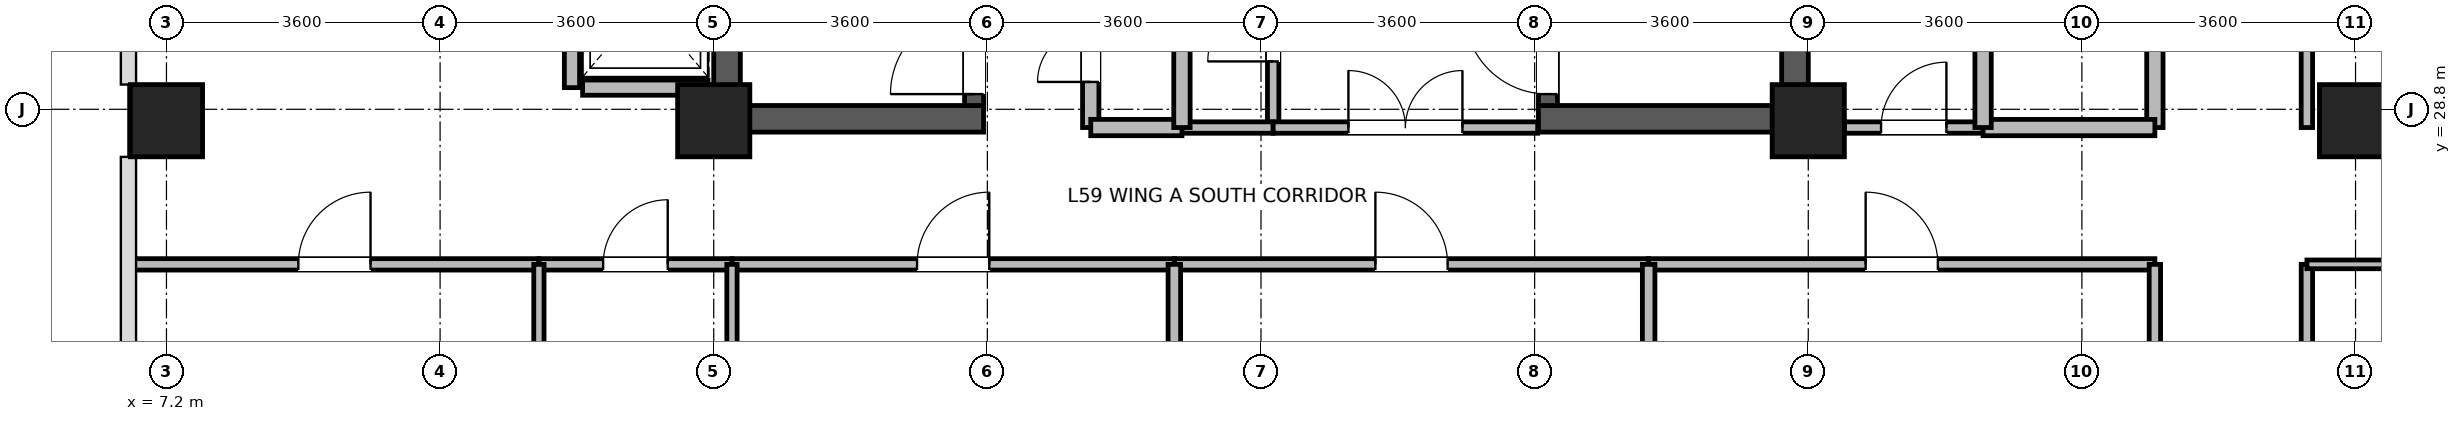
"""IFC4 building model, lengths in metres.
Left out: names, types, materials, properties, quantities, classifications, styles, units other than length and angle.
Written with IfcOpenShell. Run it as: python <this file> out.ifc"""

import sys

from ifc_helpers import new_model, si_unit, direction, frame, frame_2d, origin, origin_2d, place, context, subcontext, project, spatial, rectangle, extrude, source, transform, mapped, element, fill, save


model = new_model("IFC4")
c1 = context("Model", 3, precision=1e-05, world=origin(), true_north=direction((0.0, 1.0)))
c2 = subcontext(c1, "Body", "Model", "MODEL_VIEW")
j1 = project(units=[si_unit("LENGTHUNIT", "METRE"), si_unit("PLANEANGLEUNIT", "RADIAN")], contexts=[c1])
p1 = place(None, origin())
s1 = spatial("IfcSite", under=j1, at=p1, CompositionType="ELEMENT")
p2 = place(p1, origin())
s2 = spatial("IfcBuilding", under=s1, at=p2, CompositionType="ELEMENT")
p3 = place(p2, frame((0.0, 0.0, 231.4)))
s3 = spatial("IfcBuildingStorey", under=s2, at=p3, CompositionType="ELEMENT", Elevation=231.4)
for number, where, z_axis, x_axis in (
    (1, (14.575, 28.5, 0.0), (0.0, 0.0, 1.0), (0.0, 1.0, 0.0)),
    (2, (28.625, 28.5, 0.0), (0.0, 0.0, 1.0), (0.0, 1.0, 0.0)),
):
    element("IfcWall", number, at=place(p3, frame(where, z_axis=z_axis, x_axis=x_axis)), inside=s3, PredefinedType="SHEAR", context=c2, shape_type="SweptSolid", body=[
        extrude(rectangle(XDim=7.7, YDim=0.35, at=frame_2d((3.85, 0.0))), origin(), (0.0, 0.0, 1.0), 3.44),
    ])
for number, where, z_axis, x_axis in (
    (3, (14.75, 28.675, 0.0), (0.0, 0.0, 1.0), (1.0, 0.0, 0.0)),
    (4, (25.25, 28.675, 0.0), (0.0, 0.0, 1.0), (1.0, 0.0, 0.0)),
):
    element("IfcWall", number, at=place(p3, frame(where, z_axis=z_axis, x_axis=x_axis)), inside=s3, PredefinedType="SHEAR", context=c2, shape_type="SweptSolid", body=[
        extrude(rectangle(XDim=3.2, YDim=0.35, at=frame_2d((1.6, 0.0))), origin(), (0.0, 0.0, 1.0), 3.44),
    ])
p4 = place(p3, frame((17.825, 28.85, 0.0), z_axis=(0.0, 0.0, 1.0), x_axis=(0.0, 1.0, 0.0)))
e5 = element("IfcWall", 5, at=p4, inside=s3, PredefinedType="SHEAR", context=c2, shape_type="SweptSolid", body=[
    extrude(rectangle(XDim=7.0, YDim=0.25, at=frame_2d((3.5, 0.0))), origin(), (0.0, 0.0, 1.0), 3.44),
])
p5 = place(p4, frame((0.15, 0.0, 0.0)))
e6 = element("IfcOpeningElement", 6, at=p5, cuts=e5, PredefinedType="OPENING", context=c2, shape_type="SweptSolid", body=[
    extrude(rectangle(XDim=1.1, YDim=2.08, at=frame_2d((0.55, 1.04))), frame((0.0, 0.135, 0.0), z_axis=(0.0, -1.0, 0.0), x_axis=(1.0, 0.0, 0.0)), (0.0, 0.0, 1.0), 0.27),
])
p6 = place(p3, frame((25.375, 28.85, 0.0), z_axis=(0.0, 0.0, 1.0), x_axis=(0.0, 1.0, 0.0)))
e7 = element("IfcWall", 7, at=p6, inside=s3, PredefinedType="SHEAR", context=c2, shape_type="SweptSolid", body=[
    extrude(rectangle(XDim=7.0, YDim=0.25, at=frame_2d((3.5, 0.0))), origin(), (0.0, 0.0, 1.0), 3.44),
])
p7 = place(p6, frame((0.15, 0.0, 0.0)))
e8 = element("IfcOpeningElement", 8, at=p7, cuts=e7, PredefinedType="OPENING", context=c2, shape_type="SweptSolid", body=[
    extrude(rectangle(XDim=1.1, YDim=2.08, at=frame_2d((0.55, 1.04))), frame((0.0, 0.135, 0.0), z_axis=(0.0, -1.0, 0.0), x_axis=(1.0, 0.0, 0.0)), (0.0, 0.0, 1.0), 0.27),
])
m1 = source(origin(), c2, "Body", "SweptSolid", [
    extrude(rectangle(XDim=0.95, YDim=0.95, at=origin_2d()), origin(), (0.0, 0.0, 1.0), 3.7),
])
for number, where, z_axis, x_axis in (
    (9, (7.2, 28.65, 0.0), (0.0, 0.0, 1.0), (1.0, 0.0, 0.0)),
    (10, (14.4, 28.65, 0.0), (0.0, 0.0, 1.0), (1.0, 0.0, 0.0)),
    (11, (28.8, 28.65, 0.0), (0.0, 0.0, 1.0), (1.0, 0.0, 0.0)),
    (12, (36.0, 28.65, 0.0), (0.0, 0.0, 1.0), (1.0, 0.0, 0.0)),
):
    element("IfcColumn", number, at=place(p3, frame(where, z_axis=z_axis, x_axis=x_axis)), inside=s3, PredefinedType="COLUMN", context=c2, shape_type="MappedRepresentation", body=[
        mapped(m1, transform((0.0, 0.0, 0.0), x_axis=(1.0, 0.0, 0.0), y_axis=(0.0, 1.0, 0.0), z_axis=(0.0, 0.0, 1.0), scale=1.0)),
    ])
p8 = place(p3, frame((12.675, 29.085, 0.0), z_axis=(0.0, 0.0, 1.0), x_axis=(1.0, 0.0, 0.0)))
e13 = element("IfcWall", 13, at=p8, inside=s3, PredefinedType="PARTITIONING", context=c2, shape_type="SweptSolid", body=[
    extrude(rectangle(XDim=1.65, YDim=0.2, at=frame_2d((0.825, 0.0))), origin(), (0.0, 0.0, 1.0), 3.42),
])
p9 = place(p3, frame((12.535, 29.085, 0.0), z_axis=(0.0, 0.0, 1.0), x_axis=(0.0, 1.0, 0.0)))
e14 = element("IfcWall", 14, at=p9, inside=s3, PredefinedType="PARTITIONING", context=c2, shape_type="SweptSolid", body=[
    extrude(rectangle(XDim=2.23, YDim=0.2, at=frame_2d((1.115, 0.0))), origin(), (0.0, 0.0, 1.0), 3.42),
])
p10 = place(p3, frame((35.36, 16.96, 0.0), z_axis=(0.0, 0.0, 1.0), x_axis=(0.0, 1.0, 0.0)))
e15 = element("IfcWall", 15, at=p10, inside=s3, PredefinedType="PARTITIONING", context=c2, shape_type="SweptSolid", body=[
    extrude(rectangle(XDim=9.8, YDim=0.15, at=frame_2d((4.9, 0.0))), origin(), (0.0, 0.0, 1.0), 3.42),
])
p11 = place(p10, frame((2.486, 0.0, 0.0)))
e16 = element("IfcOpeningElement", 16, at=p11, cuts=e15, PredefinedType="OPENING", context=c2, shape_type="SweptSolid", body=[
    extrude(rectangle(XDim=1.3, YDim=2.12, at=frame_2d((0.65, 1.06))), frame((0.0, 0.085, 0.0), z_axis=(0.0, -1.0, 0.0), x_axis=(1.0, 0.0, 0.0)), (0.0, 0.0, 1.0), 0.17),
])
p12 = place(p3, frame((35.36, 28.56, 0.0), z_axis=(0.0, 0.0, 1.0), x_axis=(0.0, 1.0, 0.0)))
e17 = element("IfcWall", 17, at=p12, inside=s3, PredefinedType="PARTITIONING", context=c2, shape_type="SweptSolid", body=[
    extrude(rectangle(XDim=7.68, YDim=0.15, at=frame_2d((3.84, 0.0))), origin(), (0.0, 0.0, 1.0), 3.42),
])
p13 = place(p12, frame((3.19, 0.0, 0.0)))
e18 = element("IfcOpeningElement", 18, at=p13, cuts=e17, PredefinedType="OPENING", context=c2, shape_type="SweptSolid", body=[
    extrude(rectangle(XDim=1.3, YDim=2.12, at=frame_2d((0.65, 1.06))), frame((0.0, 0.085, 0.0), z_axis=(0.0, -1.0, 0.0), x_axis=(1.0, 0.0, 0.0)), (0.0, 0.0, 1.0), 0.17),
])
p14 = place(p3, frame((26.7, 26.76, 0.0), z_axis=(0.0, 0.0, 1.0), x_axis=(1.0, 0.0, 0.0)))
e19 = element("IfcWall", 19, at=p14, inside=s3, PredefinedType="PARTITIONING", context=c2, shape_type="SweptSolid", body=[
    extrude(rectangle(XDim=6.66, YDim=0.15, at=frame_2d((3.33, 0.0))), origin(), (0.0, 0.0, 1.0), 3.42),
])
p15 = place(p14, frame((2.855, 0.0, 0.0)))
e20 = element("IfcOpeningElement", 20, at=p15, cuts=e19, PredefinedType="OPENING", context=c2, shape_type="SweptSolid", body=[
    extrude(rectangle(XDim=0.95, YDim=2.1, at=frame_2d((0.475, 1.05))), frame((0.0, 0.085, 0.0), z_axis=(0.0, -1.0, 0.0), x_axis=(1.0, 0.0, 0.0)), (0.0, 0.0, 1.0), 0.17),
])
p16 = place(p3, frame((20.46, 26.76, 0.0), z_axis=(0.0, 0.0, 1.0), x_axis=(1.0, 0.0, 0.0)))
e21 = element("IfcWall", 21, at=p16, inside=s3, PredefinedType="PARTITIONING", context=c2, shape_type="SweptSolid", body=[
    extrude(rectangle(XDim=6.24, YDim=0.15, at=frame_2d((3.12, 0.0))), origin(), (0.0, 0.0, 1.0), 3.42),
])
p17 = place(p16, frame((2.645, 0.0, 0.0)))
e22 = element("IfcOpeningElement", 22, at=p17, cuts=e21, PredefinedType="OPENING", context=c2, shape_type="SweptSolid", body=[
    extrude(rectangle(XDim=0.95, YDim=2.1, at=frame_2d((0.475, 1.05))), frame((0.0, 0.085, 0.0), z_axis=(0.0, -1.0, 0.0), x_axis=(1.0, 0.0, 0.0)), (0.0, 0.0, 1.0), 0.17),
])
p18 = place(p3, frame((14.64, 26.76, 0.0), z_axis=(0.0, 0.0, 1.0), x_axis=(1.0, 0.0, 0.0)))
e23 = element("IfcWall", 23, at=p18, inside=s3, PredefinedType="PARTITIONING", context=c2, shape_type="SweptSolid", body=[
    extrude(rectangle(XDim=5.82, YDim=0.15, at=frame_2d((2.91, 0.0))), origin(), (0.0, 0.0, 1.0), 3.42),
])
p19 = place(p18, frame((2.435, 0.0, 0.0)))
e24 = element("IfcOpeningElement", 24, at=p19, cuts=e23, PredefinedType="OPENING", context=c2, shape_type="SweptSolid", body=[
    extrude(rectangle(XDim=0.95, YDim=2.1, at=frame_2d((0.475, 1.05))), frame((0.0, 0.085, 0.0), z_axis=(0.0, -1.0, 0.0), x_axis=(1.0, 0.0, 0.0)), (0.0, 0.0, 1.0), 0.17),
])
p20 = place(p3, frame((6.72, 26.76, 0.0), z_axis=(0.0, 0.0, 1.0), x_axis=(1.0, 0.0, 0.0)))
e25 = element("IfcWall", 25, at=p20, inside=s3, PredefinedType="PARTITIONING", context=c2, shape_type="SweptSolid", body=[
    extrude(rectangle(XDim=5.38, YDim=0.15, at=frame_2d((2.69, 0.0))), origin(), (0.0, 0.0, 1.0), 3.42),
])
p21 = place(p20, frame((2.215, 0.0, 0.0)))
e26 = element("IfcOpeningElement", 26, at=p21, cuts=e25, PredefinedType="OPENING", context=c2, shape_type="SweptSolid", body=[
    extrude(rectangle(XDim=0.95, YDim=2.1, at=frame_2d((0.475, 1.05))), frame((0.0, 0.085, 0.0), z_axis=(0.0, -1.0, 0.0), x_axis=(1.0, 0.0, 0.0)), (0.0, 0.0, 1.0), 0.17),
])
p22 = place(p3, frame((33.36, 21.6, 0.0), z_axis=(0.0, 0.0, 1.0), x_axis=(0.0, 1.0, 0.0)))
e27 = element("IfcWall", 27, at=p22, inside=s3, PredefinedType="PARTITIONING", context=c2, shape_type="SweptSolid", body=[
    extrude(rectangle(XDim=5.16, YDim=0.15, at=frame_2d((2.58, 0.0))), origin(), (0.0, 0.0, 1.0), 3.42),
])
p23 = place(p3, frame((33.36, 28.56, 0.0), z_axis=(0.0, 0.0, 1.0), x_axis=(0.0, 1.0, 0.0)))
e28 = element("IfcWall", 28, at=p23, inside=s3, PredefinedType="PARTITIONING", context=c2, shape_type="SweptSolid", body=[
    extrude(rectangle(XDim=3.84, YDim=0.215, at=frame_2d((1.92, 0.0))), origin(), (0.0, 0.0, 1.0), 3.42),
])
p24 = place(p23, frame((1.22, 0.0, 0.0)))
e29 = element("IfcOpeningElement", 29, at=p24, cuts=e28, PredefinedType="OPENING", context=c2, shape_type="SweptSolid", body=[
    extrude(rectangle(XDim=1.4, YDim=2.15, at=frame_2d((0.7, 1.075))), frame((0.0, 0.118, 0.0), z_axis=(0.0, -1.0, 0.0), x_axis=(1.0, 0.0, 0.0)), (0.0, 0.0, 1.0), 0.235),
])
p25 = place(p3, frame((19.36, 28.56, 0.0), z_axis=(0.0, 0.0, 1.0), x_axis=(0.0, 1.0, 0.0)))
e30 = element("IfcWall", 30, at=p25, inside=s3, PredefinedType="PARTITIONING", context=c2, shape_type="SweptSolid", body=[
    extrude(rectangle(XDim=2.6, YDim=0.215, at=frame_2d((1.3, 0.0))), origin(), (0.0, 0.0, 1.0), 3.42),
])
p26 = place(p25, frame((0.6, 0.0, 0.0)))
e31 = element("IfcOpeningElement", 31, at=p26, cuts=e30, PredefinedType="OPENING", context=c2, shape_type="SweptSolid", body=[
    extrude(rectangle(XDim=1.4, YDim=2.15, at=frame_2d((0.7, 1.075))), frame((0.0, 0.118, 0.0), z_axis=(0.0, -1.0, 0.0), x_axis=(1.0, 0.0, 0.0)), (0.0, 0.0, 1.0), 0.235),
])
p27 = place(p3, frame((21.76, 28.56, 0.0), z_axis=(0.0, 0.0, 1.0), x_axis=(0.0, 1.0, 0.0)))
e32 = element("IfcWall", 32, at=p27, inside=s3, PredefinedType="PARTITIONING", context=c2, shape_type="SweptSolid", body=[
    extrude(rectangle(XDim=2.6, YDim=0.15, at=frame_2d((1.3, 0.0))), origin(), (0.0, 0.0, 1.0), 3.42),
])
p28 = place(p27, frame((0.87, 0.0, 0.0)))
e33 = element("IfcOpeningElement", 33, at=p28, cuts=e32, PredefinedType="OPENING", context=c2, shape_type="SweptSolid", body=[
    extrude(rectangle(XDim=0.86, YDim=2.02, at=frame_2d((0.43, 1.01))), frame((0.0, 0.085, 0.0), z_axis=(0.0, -1.0, 0.0), x_axis=(1.0, 0.0, 0.0)), (0.0, 0.0, 1.0), 0.17),
])
p29 = place(p3, frame((12.1, 26.76, 0.0), z_axis=(0.0, 0.0, 1.0), x_axis=(1.0, 0.0, 0.0)))
e34 = element("IfcWall", 34, at=p29, inside=s3, PredefinedType="PARTITIONING", context=c2, shape_type="SweptSolid", body=[
    extrude(rectangle(XDim=2.54, YDim=0.15, at=frame_2d((1.27, 0.0))), origin(), (0.0, 0.0, 1.0), 3.42),
])
p30 = place(p29, frame((0.845, 0.0, 0.0)))
e35 = element("IfcOpeningElement", 35, at=p30, cuts=e34, PredefinedType="OPENING", context=c2, shape_type="SweptSolid", body=[
    extrude(rectangle(XDim=0.85, YDim=2.04, at=frame_2d((0.425, 1.02))), frame((0.0, 0.085, 0.0), z_axis=(0.0, -1.0, 0.0), x_axis=(1.0, 0.0, 0.0)), (0.0, 0.0, 1.0), 0.17),
])
p31 = place(p3, frame((29.275, 28.56, 0.0), z_axis=(0.0, 0.0, 1.0), x_axis=(1.0, 0.0, 0.0)))
e36 = element("IfcWall", 36, at=p31, inside=s3, PredefinedType="PARTITIONING", context=c2, shape_type="SweptSolid", body=[
    extrude(rectangle(XDim=1.825, YDim=0.15, at=frame_2d((0.913, 0.0))), origin(), (0.0, 0.0, 1.0), 2.87),
])
p32 = place(p31, frame((0.482, 0.0, 0.0)))
e37 = element("IfcOpeningElement", 37, at=p32, cuts=e36, PredefinedType="OPENING", context=c2, shape_type="SweptSolid", body=[
    extrude(rectangle(XDim=0.86, YDim=2.02, at=frame_2d((0.43, 1.01))), frame((0.0, 0.085, 0.0), z_axis=(0.0, -1.0, 0.0), x_axis=(1.0, 0.0, 0.0)), (0.0, 0.0, 1.0), 0.17),
])
p33 = place(p3, frame((31.1, 28.56, 0.0), z_axis=(0.0, 0.0, 1.0), x_axis=(1.0, 0.0, 0.0)))
e38 = element("IfcWall", 38, at=p33, inside=s3, PredefinedType="PARTITIONING", context=c2, shape_type="SweptSolid", body=[
    extrude(rectangle(XDim=2.26, YDim=0.215, at=frame_2d((1.13, 0.0))), origin(), (0.0, 0.0, 1.0), 2.87),
])
p34 = place(p3, frame((20.56, 28.56, 0.0), z_axis=(0.0, 0.0, 1.0), x_axis=(1.0, 0.0, 0.0)))
e39 = element("IfcWall", 39, at=p34, inside=s3, PredefinedType="PARTITIONING", context=c2, shape_type="SweptSolid", body=[
    extrude(rectangle(XDim=1.2, YDim=0.15, at=frame_2d((0.6, 0.0))), origin(), (0.0, 0.0, 1.0), 2.52),
])
p35 = place(p3, frame((19.36, 28.56, 0.0), z_axis=(0.0, 0.0, 1.0), x_axis=(1.0, 0.0, 0.0)))
e40 = element("IfcWall", 40, at=p35, inside=s3, PredefinedType="PARTITIONING", context=c2, shape_type="SweptSolid", body=[
    extrude(rectangle(XDim=1.2, YDim=0.215, at=frame_2d((0.6, 0.0))), origin(), (0.0, 0.0, 1.0), 2.52),
])
p36 = place(p3, frame((35.36, 26.76, 0.0), z_axis=(0.0, 0.0, 1.0), x_axis=(1.0, 0.0, 0.0)))
e41 = element("IfcWall", 41, at=p36, inside=s3, PredefinedType="PARTITIONING", context=c2, shape_type="SweptSolid", body=[
    extrude(rectangle(XDim=6.66, YDim=0.115, at=frame_2d((3.33, 0.0))), origin(), (0.0, 0.0, 1.0), 3.42),
])
for number, where, z_axis, x_axis in (
    (42, (12.1, 21.732, 0.0), (0.0, 0.0, 1.0), (0.0, 1.0, 0.0)),
    (43, (14.64, 21.732, 0.0), (0.0, 0.0, 1.0), (0.0, 1.0, 0.0)),
):
    element("IfcWall", number, at=place(p3, frame(where, z_axis=z_axis, x_axis=x_axis)), inside=s3, PredefinedType="PARTITIONING", context=c2, shape_type="SweptSolid", body=[
        extrude(rectangle(XDim=5.028, YDim=0.135, at=frame_2d((2.514, 0.0))), origin(), (0.0, 0.0, 1.0), 3.42),
    ])
for number, where, z_axis, x_axis in (
    (44, (20.46, 21.732, 0.0), (0.0, 0.0, 1.0), (0.0, 1.0, 0.0)),
    (45, (26.7, 21.732, 0.0), (0.0, 0.0, 1.0), (0.0, 1.0, 0.0)),
):
    element("IfcWall", number, at=place(p3, frame(where, z_axis=z_axis, x_axis=x_axis)), inside=s3, PredefinedType="PARTITIONING", context=c2, shape_type="SweptSolid", body=[
        extrude(rectangle(XDim=5.028, YDim=0.165, at=frame_2d((2.514, 0.0))), origin(), (0.0, 0.0, 1.0), 3.42),
    ])
p37 = place(p3, frame((31.1, 28.56, 0.0), z_axis=(0.0, 0.0, 1.0), x_axis=(0.0, 1.0, 0.0)))
e46 = element("IfcWall", 46, at=p37, inside=s3, PredefinedType="PARTITIONING", context=c2, shape_type="SweptSolid", body=[
    extrude(rectangle(XDim=3.84, YDim=0.215, at=frame_2d((1.92, 0.0))), origin(), (0.0, 0.0, 1.0), 3.42),
])
p38 = place(p3, frame((21.76, 28.56, 0.0), z_axis=(0.0, 0.0, 1.0), x_axis=(1.0, 0.0, 0.0)))
e47 = element("IfcWall", 47, at=p38, inside=s3, PredefinedType="PARTITIONING", context=c2, shape_type="SweptSolid", body=[
    extrude(rectangle(XDim=3.48, YDim=0.15, at=frame_2d((1.74, 0.0))), origin(), (0.0, 0.0, 1.0), 2.52),
])
p39 = place(p38, frame((0.99, 0.0, 0.0)))
e48 = element("IfcOpeningElement", 48, at=p39, cuts=e47, PredefinedType="OPENING", context=c2, shape_type="SweptSolid", body=[
    extrude(rectangle(XDim=1.5, YDim=2.1, at=frame_2d((0.75, 1.05))), frame((0.0, 0.085, 0.0), z_axis=(0.0, -1.0, 0.0), x_axis=(1.0, 0.0, 0.0)), (0.0, 0.0, 1.0), 0.17),
])
p40 = place(p3, frame((20.56, 28.56, 0.0), z_axis=(0.0, 0.0, 1.0), x_axis=(0.0, 1.0, 0.0)))
e49 = element("IfcWall", 49, at=p40, inside=s3, PredefinedType="PARTITIONING", context=c2, shape_type="SweptSolid", body=[
    extrude(rectangle(XDim=2.6, YDim=0.215, at=frame_2d((1.3, 0.0))), origin(), (0.0, 0.0, 1.0), 3.42),
])
p41 = place(p5, origin())
e50 = element("IfcDoor", 50, at=p41, inside=s3, OperationType="SINGLE_SWING_LEFT", PredefinedType="DOOR", context=c2, shape_type="SweptSolid", body=[
    extrude(rectangle(XDim=1.1, YDim=2.08, at=frame_2d((0.55, 1.04))), frame((0.0, 0.025, 0.0), z_axis=(0.0, -1.0, 0.0), x_axis=(1.0, 0.0, 0.0)), (0.0, 0.0, 1.0), 0.05),
])
fill(e6, e50)
p42 = place(p7, origin())
e51 = element("IfcDoor", 51, at=p42, inside=s3, OperationType="SINGLE_SWING_RIGHT", PredefinedType="DOOR", context=c2, shape_type="SweptSolid", body=[
    extrude(rectangle(XDim=1.1, YDim=2.08, at=frame_2d((0.55, 1.04))), frame((0.0, 0.025, 0.0), z_axis=(0.0, -1.0, 0.0), x_axis=(1.0, 0.0, 0.0)), (0.0, 0.0, 1.0), 0.05),
])
fill(e8, e51)
p43 = place(p15, origin())
e52 = element("IfcDoor", 52, at=p43, inside=s3, OperationType="SINGLE_SWING_LEFT", PredefinedType="DOOR", context=c2, shape_type="SweptSolid", body=[
    extrude(rectangle(XDim=0.95, YDim=2.1, at=frame_2d((0.475, 1.05))), frame((0.0, 0.025, 0.0), z_axis=(0.0, -1.0, 0.0), x_axis=(1.0, 0.0, 0.0)), (0.0, 0.0, 1.0), 0.05),
])
fill(e20, e52)
p44 = place(p17, origin())
e53 = element("IfcDoor", 53, at=p44, inside=s3, OperationType="SINGLE_SWING_LEFT", PredefinedType="DOOR", context=c2, shape_type="SweptSolid", body=[
    extrude(rectangle(XDim=0.95, YDim=2.1, at=frame_2d((0.475, 1.05))), frame((0.0, 0.025, 0.0), z_axis=(0.0, -1.0, 0.0), x_axis=(1.0, 0.0, 0.0)), (0.0, 0.0, 1.0), 0.05),
])
fill(e22, e53)
p45 = place(p19, origin())
e54 = element("IfcDoor", 54, at=p45, inside=s3, OperationType="SINGLE_SWING_RIGHT", PredefinedType="DOOR", context=c2, shape_type="SweptSolid", body=[
    extrude(rectangle(XDim=0.95, YDim=2.1, at=frame_2d((0.475, 1.05))), frame((0.0, 0.025, 0.0), z_axis=(0.0, -1.0, 0.0), x_axis=(1.0, 0.0, 0.0)), (0.0, 0.0, 1.0), 0.05),
])
fill(e24, e54)
p46 = place(p21, origin())
e55 = element("IfcDoor", 55, at=p46, inside=s3, OperationType="SINGLE_SWING_RIGHT", PredefinedType="DOOR", context=c2, shape_type="SweptSolid", body=[
    extrude(rectangle(XDim=0.95, YDim=2.1, at=frame_2d((0.475, 1.05))), frame((0.0, 0.025, 0.0), z_axis=(0.0, -1.0, 0.0), x_axis=(1.0, 0.0, 0.0)), (0.0, 0.0, 1.0), 0.05),
])
fill(e26, e55)
p47 = place(p26, origin())
e56 = element("IfcDoor", 56, at=p47, inside=s3, OperationType="DOUBLE_DOOR_SINGLE_SWING", PredefinedType="DOOR", context=c2, shape_type="SweptSolid", body=[
    extrude(rectangle(XDim=1.4, YDim=2.15, at=frame_2d((0.7, 1.075))), frame((0.0, 0.025, 0.0), z_axis=(0.0, -1.0, 0.0), x_axis=(1.0, 0.0, 0.0)), (0.0, 0.0, 1.0), 0.05),
])
fill(e31, e56)
p48 = place(p28, origin())
e57 = element("IfcDoor", 57, at=p48, inside=s3, OperationType="SINGLE_SWING_LEFT", PredefinedType="DOOR", context=c2, shape_type="SweptSolid", body=[
    extrude(rectangle(XDim=0.86, YDim=2.02, at=frame_2d((0.43, 1.01))), frame((0.0, 0.025, 0.0), z_axis=(0.0, -1.0, 0.0), x_axis=(1.0, 0.0, 0.0)), (0.0, 0.0, 1.0), 0.05),
])
fill(e33, e57)
p49 = place(p30, origin())
e58 = element("IfcDoor", 58, at=p49, inside=s3, OperationType="SINGLE_SWING_RIGHT", PredefinedType="DOOR", context=c2, shape_type="SweptSolid", body=[
    extrude(rectangle(XDim=0.85, YDim=2.04, at=frame_2d((0.425, 1.02))), frame((0.0, 0.025, 0.0), z_axis=(0.0, -1.0, 0.0), x_axis=(1.0, 0.0, 0.0)), (0.0, 0.0, 1.0), 0.05),
])
fill(e35, e58)
p50 = place(p32, origin())
e59 = element("IfcDoor", 59, at=p50, inside=s3, OperationType="SINGLE_SWING_RIGHT", PredefinedType="DOOR", context=c2, shape_type="SweptSolid", body=[
    extrude(rectangle(XDim=0.86, YDim=2.02, at=frame_2d((0.43, 1.01))), frame((0.0, 0.025, 0.0), z_axis=(0.0, -1.0, 0.0), x_axis=(1.0, 0.0, 0.0)), (0.0, 0.0, 1.0), 0.05),
])
fill(e37, e59)
p51 = place(p39, origin())
e60 = element("IfcDoor", 60, at=p51, inside=s3, OperationType="DOUBLE_DOOR_SINGLE_SWING", PredefinedType="DOOR", context=c2, shape_type="SweptSolid", body=[
    extrude(rectangle(XDim=1.5, YDim=2.1, at=frame_2d((0.75, 1.05))), frame((0.0, 0.025, 0.0), z_axis=(0.0, -1.0, 0.0), x_axis=(1.0, 0.0, 0.0)), (0.0, 0.0, 1.0), 0.05),
])
fill(e48, e60)
save(model, sys.argv[1])
